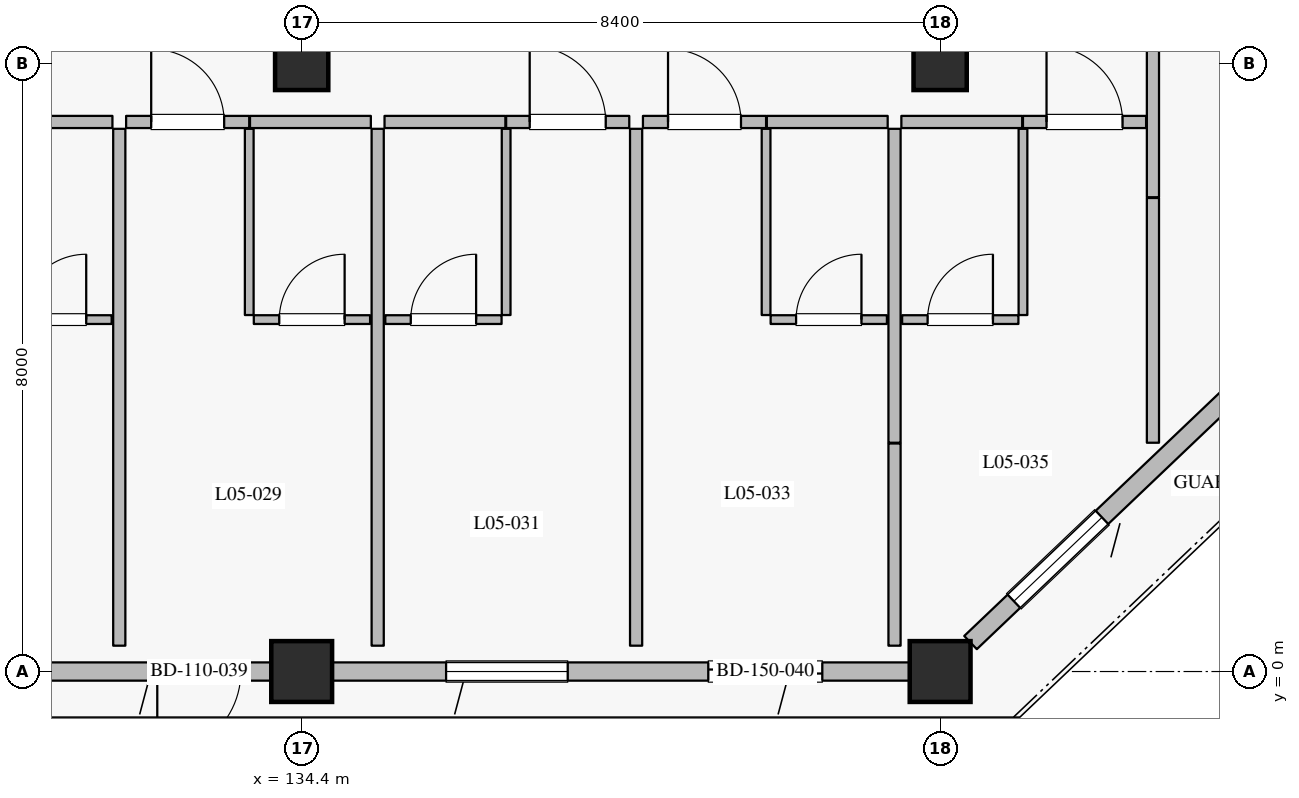
"""IFC4 building model, lengths in metres.
Left out: names, types, materials, properties, quantities, classifications, styles, units other than length and angle.
Written with IfcOpenShell. Run it as: python <this file> out.ifc"""

import sys

from ifc_helpers import new_model, si_unit, direction, frame, frame_2d, origin, origin_2d, place, context, subcontext, project, spatial, rectangle, extrude, element, fill, save


model = new_model("IFC4")
c1 = context("Model", 3, precision=1e-05, world=origin(), true_north=direction((0.0, 1.0)))
c2 = subcontext(c1, "Body", "Model", "MODEL_VIEW")
j1 = project(units=[si_unit("LENGTHUNIT", "METRE"), si_unit("PLANEANGLEUNIT", "RADIAN")], contexts=[c1])
p1 = place(None, origin())
s1 = spatial("IfcSite", under=j1, at=p1, CompositionType="ELEMENT")
p2 = place(p1, origin())
s2 = spatial("IfcBuilding", under=s1, at=p2, CompositionType="ELEMENT")
p3 = place(p2, frame((0.0, 0.0, 25.2)))
s3 = spatial("IfcBuildingStorey", under=s2, at=p3, CompositionType="ELEMENT", Elevation=25.2)
for number, where, z_axis, x_axis in (
    (1, (134.4, 0.0, 0.0), (0.0, 0.0, 1.0), (1.0, 0.0, 0.0)),
    (2, (142.8, 0.0, 0.0), (0.0, 0.0, 1.0), (1.0, 0.0, 0.0)),
):
    element("IfcColumn", number, at=place(p3, frame(where, z_axis=z_axis, x_axis=x_axis)), inside=s3, PredefinedType="COLUMN", context=c2, shape_type="SweptSolid", body=[
        extrude(rectangle(XDim=0.8, YDim=0.8, at=origin_2d()), origin(), (0.0, 0.0, 1.0), 3.6),
    ])
for number, where, z_axis, x_axis in (
    (3, (134.4, 8.0, 0.0), (0.0, 0.0, 1.0), (1.0, 0.0, 0.0)),
    (4, (142.8, 8.0, 0.0), (0.0, 0.0, 1.0), (1.0, 0.0, 0.0)),
):
    element("IfcColumn", number, at=place(p3, frame(where, z_axis=z_axis, x_axis=x_axis)), inside=s3, PredefinedType="COLUMN", context=c2, shape_type="SweptSolid", body=[
        extrude(rectangle(XDim=0.7, YDim=0.7, at=origin_2d()), origin(), (0.0, 0.0, 1.0), 3.6),
    ])
p4 = place(p3, frame((134.0, 0.0, 0.0), z_axis=(0.0, 0.0, 1.0), x_axis=(-1.0, 0.0, 0.0)))
e5 = element("IfcWall", 5, at=p4, inside=s3, PredefinedType="SOLIDWALL", context=c2, shape_type="SweptSolid", body=[
    extrude(rectangle(XDim=7.6, YDim=0.24, at=frame_2d((3.8, 0.0))), origin(), (0.0, 0.0, 1.0), 2.93),
])
p5 = place(p4, frame((0.4, 0.0, 0.0)))
e6 = element("IfcOpeningElement", 6, at=p5, cuts=e5, PredefinedType="OPENING", context=c2, shape_type="SweptSolid", body=[
    extrude(rectangle(XDim=1.1, YDim=2.2, at=frame_2d((0.55, 1.1))), frame((0.0, 0.13, 0.0), z_axis=(0.0, -1.0, 0.0), x_axis=(1.0, 0.0, 0.0)), (0.0, 0.0, 1.0), 0.26),
])
p6 = place(p4, frame((2.9, 0.0, 0.8)))
e7 = element("IfcOpeningElement", 7, at=p6, cuts=e5, PredefinedType="OPENING", context=c2, shape_type="SweptSolid", body=[
    extrude(rectangle(XDim=1.6, YDim=1.6, at=frame_2d((0.8, 0.8))), frame((0.0, 0.13, 0.0), z_axis=(0.0, -1.0, 0.0), x_axis=(1.0, 0.0, 0.0)), (0.0, 0.0, 1.0), 0.26),
])
p7 = place(p4, frame((5.75, 0.0, 0.8)))
e8 = element("IfcOpeningElement", 8, at=p7, cuts=e5, PredefinedType="OPENING", context=c2, shape_type="SweptSolid", body=[
    extrude(rectangle(XDim=1.6, YDim=1.6, at=frame_2d((0.8, 0.8))), frame((0.0, 0.13, 0.0), z_axis=(0.0, -1.0, 0.0), x_axis=(1.0, 0.0, 0.0)), (0.0, 0.0, 1.0), 0.26),
])
p8 = place(p3, frame((142.4, 0.0, 0.0), z_axis=(0.0, 0.0, 1.0), x_axis=(-1.0, 0.0, 0.0)))
e9 = element("IfcWall", 9, at=p8, inside=s3, PredefinedType="SOLIDWALL", context=c2, shape_type="SweptSolid", body=[
    extrude(rectangle(XDim=7.6, YDim=0.24, at=frame_2d((3.8, 0.0))), origin(), (0.0, 0.0, 1.0), 2.93),
])
p9 = place(p8, frame((1.15, 0.0, 0.0)))
e10 = element("IfcOpeningElement", 10, at=p9, cuts=e9, PredefinedType="OPENING", context=c2, shape_type="SweptSolid", body=[
    extrude(rectangle(XDim=1.5, YDim=2.25, at=frame_2d((0.75, 1.125))), frame((0.0, 0.13, 0.0), z_axis=(0.0, -1.0, 0.0), x_axis=(1.0, 0.0, 0.0)), (0.0, 0.0, 1.0), 0.26),
])
p10 = place(p8, frame((4.5, 0.0, 0.8)))
e11 = element("IfcOpeningElement", 11, at=p10, cuts=e9, PredefinedType="OPENING", context=c2, shape_type="SweptSolid", body=[
    extrude(rectangle(XDim=1.6, YDim=1.6, at=frame_2d((0.8, 0.8))), frame((0.0, 0.13, 0.0), z_axis=(0.0, -1.0, 0.0), x_axis=(1.0, 0.0, 0.0)), (0.0, 0.0, 1.0), 0.26),
])
p11 = place(p3, frame((150.8, 7.619, 0.0), z_axis=(0.0, 0.0, 1.0), x_axis=(-0.724156739794, -0.689635422677, 0.0)))
e12 = element("IfcWall", 12, at=p11, inside=s3, PredefinedType="SOLIDWALL", context=c2, shape_type="SweptSolid", body=[
    extrude(rectangle(XDim=10.495, YDim=0.24, at=frame_2d((5.248, 0.0))), origin(), (0.0, 0.0, 1.0), 2.93),
])
p12 = place(p11, frame((0.424, 0.0, 0.0)))
e13 = element("IfcOpeningElement", 13, at=p12, cuts=e12, PredefinedType="OPENING", context=c2, shape_type="SweptSolid", body=[
    extrude(rectangle(XDim=1.5, YDim=2.25, at=frame_2d((0.75, 1.125))), frame((0.0, 0.13, 0.0), z_axis=(0.0, -1.0, 0.0), x_axis=(1.0, 0.0, 0.0)), (0.0, 0.0, 1.0), 0.26),
])
p13 = place(p11, frame((4.033, 0.0, 0.8)))
e14 = element("IfcOpeningElement", 14, at=p13, cuts=e12, PredefinedType="OPENING", context=c2, shape_type="SweptSolid", body=[
    extrude(rectangle(XDim=1.6, YDim=1.6, at=frame_2d((0.8, 0.8))), frame((0.0, 0.13, 0.0), z_axis=(0.0, -1.0, 0.0), x_axis=(1.0, 0.0, 0.0)), (0.0, 0.0, 1.0), 0.26),
])
p14 = place(p11, frame((8.107, 0.0, 0.8)))
e15 = element("IfcOpeningElement", 15, at=p14, cuts=e12, PredefinedType="OPENING", context=c2, shape_type="SweptSolid", body=[
    extrude(rectangle(XDim=1.6, YDim=1.6, at=frame_2d((0.8, 0.8))), frame((0.0, 0.13, 0.0), z_axis=(0.0, -1.0, 0.0), x_axis=(1.0, 0.0, 0.0)), (0.0, 0.0, 1.0), 0.26),
])
p15 = place(p3, frame((130.32, 7.23, 0.0), z_axis=(0.0, 0.0, 1.0), x_axis=(1.0, 0.0, 0.0)))
e16 = element("IfcWall", 16, at=p15, inside=s3, PredefinedType="PARTITIONING", context=c2, shape_type="SweptSolid", body=[
    extrude(rectangle(XDim=1.59, YDim=0.16, at=frame_2d((0.795, 0.0))), origin(), (0.0, 0.0, 1.0), 3.335),
])
p16 = place(p3, frame((130.37, 4.63, 0.0), z_axis=(0.0, 0.0, 1.0), x_axis=(1.0, 0.0, 0.0)))
e17 = element("IfcWall", 17, at=p16, inside=s3, PredefinedType="PARTITIONING", context=c2, shape_type="SweptSolid", body=[
    extrude(rectangle(XDim=1.53, YDim=0.115, at=frame_2d((0.765, 0.0))), origin(), (0.0, 0.0, 1.0), 3.335),
])
p17 = place(p16, frame((0.335, 0.0, 0.0)))
e18 = element("IfcOpeningElement", 18, at=p17, cuts=e17, PredefinedType="OPENING", context=c2, shape_type="SweptSolid", body=[
    extrude(rectangle(XDim=0.86, YDim=2.12, at=frame_2d((0.43, 1.06))), frame((0.0, 0.067, 0.0), z_axis=(0.0, -1.0, 0.0), x_axis=(1.0, 0.0, 0.0)), (0.0, 0.0, 1.0), 0.135),
])
p18 = place(p3, frame((132.09, 7.23, 0.0), z_axis=(0.0, 0.0, 1.0), x_axis=(1.0, 0.0, 0.0)))
e19 = element("IfcWall", 19, at=p18, inside=s3, PredefinedType="PARTITIONING", context=c2, shape_type="SweptSolid", body=[
    extrude(rectangle(XDim=1.62, YDim=0.16, at=frame_2d((0.81, 0.0))), origin(), (0.0, 0.0, 1.0), 3.335),
])
p19 = place(p18, frame((0.33, 0.0, 0.0)))
e20 = element("IfcOpeningElement", 20, at=p19, cuts=e19, PredefinedType="OPENING", context=c2, shape_type="SweptSolid", body=[
    extrude(rectangle(XDim=0.96, YDim=2.2, at=frame_2d((0.48, 1.1))), frame((0.0, 0.09, 0.0), z_axis=(0.0, -1.0, 0.0), x_axis=(1.0, 0.0, 0.0)), (0.0, 0.0, 1.0), 0.18),
])
p20 = place(p3, frame((133.72, 7.23, 0.0), z_axis=(0.0, 0.0, 1.0), x_axis=(1.0, 0.0, 0.0)))
e21 = element("IfcWall", 21, at=p20, inside=s3, PredefinedType="PARTITIONING", context=c2, shape_type="SweptSolid", body=[
    extrude(rectangle(XDim=1.59, YDim=0.16, at=frame_2d((0.795, 0.0))), origin(), (0.0, 0.0, 1.0), 3.335),
])
p21 = place(p3, frame((133.71, 4.69, 0.0), z_axis=(0.0, 0.0, 1.0), x_axis=(0.0, 1.0, 0.0)))
e22 = element("IfcWall", 22, at=p21, inside=s3, PredefinedType="PARTITIONING", context=c2, shape_type="SweptSolid", body=[
    extrude(rectangle(XDim=2.45, YDim=0.115, at=frame_2d((1.225, 0.0))), origin(), (0.0, 0.0, 1.0), 3.335),
])
p22 = place(p3, frame((133.77, 4.63, 0.0), z_axis=(0.0, 0.0, 1.0), x_axis=(1.0, 0.0, 0.0)))
e23 = element("IfcWall", 23, at=p22, inside=s3, PredefinedType="PARTITIONING", context=c2, shape_type="SweptSolid", body=[
    extrude(rectangle(XDim=1.53, YDim=0.115, at=frame_2d((0.765, 0.0))), origin(), (0.0, 0.0, 1.0), 3.335),
])
p23 = place(p22, frame((0.335, 0.0, 0.0)))
e24 = element("IfcOpeningElement", 24, at=p23, cuts=e23, PredefinedType="OPENING", context=c2, shape_type="SweptSolid", body=[
    extrude(rectangle(XDim=0.86, YDim=2.12, at=frame_2d((0.43, 1.06))), frame((0.0, 0.067, 0.0), z_axis=(0.0, -1.0, 0.0), x_axis=(1.0, 0.0, 0.0)), (0.0, 0.0, 1.0), 0.135),
])
p24 = place(p3, frame((132.0, 0.34, 0.0), z_axis=(0.0, 0.0, 1.0), x_axis=(0.0, 1.0, 0.0)))
e25 = element("IfcWall", 25, at=p24, inside=s3, PredefinedType="PARTITIONING", context=c2, shape_type="SweptSolid", body=[
    extrude(rectangle(XDim=6.8, YDim=0.16, at=frame_2d((3.4, 0.0))), origin(), (0.0, 0.0, 1.0), 3.335),
])
p25 = place(p3, frame((135.49, 7.23, 0.0), z_axis=(0.0, 0.0, 1.0), x_axis=(1.0, 0.0, 0.0)))
e26 = element("IfcWall", 26, at=p25, inside=s3, PredefinedType="PARTITIONING", context=c2, shape_type="SweptSolid", body=[
    extrude(rectangle(XDim=1.59, YDim=0.16, at=frame_2d((0.795, 0.0))), origin(), (0.0, 0.0, 1.0), 3.335),
])
p26 = place(p3, frame((137.09, 7.23, 0.0), z_axis=(0.0, 0.0, 1.0), x_axis=(1.0, 0.0, 0.0)))
e27 = element("IfcWall", 27, at=p26, inside=s3, PredefinedType="PARTITIONING", context=c2, shape_type="SweptSolid", body=[
    extrude(rectangle(XDim=1.62, YDim=0.16, at=frame_2d((0.81, 0.0))), origin(), (0.0, 0.0, 1.0), 3.335),
])
p27 = place(p26, frame((0.31, 0.0, 0.0)))
e28 = element("IfcOpeningElement", 28, at=p27, cuts=e27, PredefinedType="OPENING", context=c2, shape_type="SweptSolid", body=[
    extrude(rectangle(XDim=1.0, YDim=2.25, at=frame_2d((0.5, 1.125))), frame((0.0, 0.09, 0.0), z_axis=(0.0, -1.0, 0.0), x_axis=(1.0, 0.0, 0.0)), (0.0, 0.0, 1.0), 0.18),
])
p28 = place(p3, frame((137.09, 4.69, 0.0), z_axis=(0.0, 0.0, 1.0), x_axis=(0.0, 1.0, 0.0)))
e29 = element("IfcWall", 29, at=p28, inside=s3, PredefinedType="PARTITIONING", context=c2, shape_type="SweptSolid", body=[
    extrude(rectangle(XDim=2.45, YDim=0.115, at=frame_2d((1.225, 0.0))), origin(), (0.0, 0.0, 1.0), 3.335),
])
p29 = place(p3, frame((135.5, 4.63, 0.0), z_axis=(0.0, 0.0, 1.0), x_axis=(1.0, 0.0, 0.0)))
e30 = element("IfcWall", 30, at=p29, inside=s3, PredefinedType="PARTITIONING", context=c2, shape_type="SweptSolid", body=[
    extrude(rectangle(XDim=1.53, YDim=0.115, at=frame_2d((0.765, 0.0))), origin(), (0.0, 0.0, 1.0), 3.335),
])
p30 = place(p29, frame((0.335, 0.0, 0.0)))
e31 = element("IfcOpeningElement", 31, at=p30, cuts=e30, PredefinedType="OPENING", context=c2, shape_type="SweptSolid", body=[
    extrude(rectangle(XDim=0.86, YDim=2.12, at=frame_2d((0.43, 1.06))), frame((0.0, 0.067, 0.0), z_axis=(0.0, -1.0, 0.0), x_axis=(1.0, 0.0, 0.0)), (0.0, 0.0, 1.0), 0.135),
])
p31 = place(p3, frame((135.4, 0.34, 0.0), z_axis=(0.0, 0.0, 1.0), x_axis=(0.0, 1.0, 0.0)))
e32 = element("IfcWall", 32, at=p31, inside=s3, PredefinedType="PARTITIONING", context=c2, shape_type="SweptSolid", body=[
    extrude(rectangle(XDim=6.8, YDim=0.16, at=frame_2d((3.4, 0.0))), origin(), (0.0, 0.0, 1.0), 3.335),
])
p32 = place(p3, frame((138.89, 7.23, 0.0), z_axis=(0.0, 0.0, 1.0), x_axis=(1.0, 0.0, 0.0)))
e33 = element("IfcWall", 33, at=p32, inside=s3, PredefinedType="PARTITIONING", context=c2, shape_type="SweptSolid", body=[
    extrude(rectangle(XDim=1.62, YDim=0.16, at=frame_2d((0.81, 0.0))), origin(), (0.0, 0.0, 1.0), 3.335),
])
p33 = place(p32, frame((0.33, 0.0, 0.0)))
e34 = element("IfcOpeningElement", 34, at=p33, cuts=e33, PredefinedType="OPENING", context=c2, shape_type="SweptSolid", body=[
    extrude(rectangle(XDim=0.96, YDim=2.2, at=frame_2d((0.48, 1.1))), frame((0.0, 0.09, 0.0), z_axis=(0.0, -1.0, 0.0), x_axis=(1.0, 0.0, 0.0)), (0.0, 0.0, 1.0), 0.18),
])
p34 = place(p3, frame((140.52, 7.23, 0.0), z_axis=(0.0, 0.0, 1.0), x_axis=(1.0, 0.0, 0.0)))
e35 = element("IfcWall", 35, at=p34, inside=s3, PredefinedType="PARTITIONING", context=c2, shape_type="SweptSolid", body=[
    extrude(rectangle(XDim=1.59, YDim=0.16, at=frame_2d((0.795, 0.0))), origin(), (0.0, 0.0, 1.0), 3.335),
])
p35 = place(p3, frame((140.51, 4.69, 0.0), z_axis=(0.0, 0.0, 1.0), x_axis=(0.0, 1.0, 0.0)))
e36 = element("IfcWall", 36, at=p35, inside=s3, PredefinedType="PARTITIONING", context=c2, shape_type="SweptSolid", body=[
    extrude(rectangle(XDim=2.45, YDim=0.115, at=frame_2d((1.225, 0.0))), origin(), (0.0, 0.0, 1.0), 3.335),
])
p36 = place(p3, frame((140.57, 4.63, 0.0), z_axis=(0.0, 0.0, 1.0), x_axis=(1.0, 0.0, 0.0)))
e37 = element("IfcWall", 37, at=p36, inside=s3, PredefinedType="PARTITIONING", context=c2, shape_type="SweptSolid", body=[
    extrude(rectangle(XDim=1.53, YDim=0.115, at=frame_2d((0.765, 0.0))), origin(), (0.0, 0.0, 1.0), 3.335),
])
p37 = place(p36, frame((0.335, 0.0, 0.0)))
e38 = element("IfcOpeningElement", 38, at=p37, cuts=e37, PredefinedType="OPENING", context=c2, shape_type="SweptSolid", body=[
    extrude(rectangle(XDim=0.86, YDim=2.12, at=frame_2d((0.43, 1.06))), frame((0.0, 0.067, 0.0), z_axis=(0.0, -1.0, 0.0), x_axis=(1.0, 0.0, 0.0)), (0.0, 0.0, 1.0), 0.135),
])
p38 = place(p3, frame((138.8, 0.34, 0.0), z_axis=(0.0, 0.0, 1.0), x_axis=(0.0, 1.0, 0.0)))
e39 = element("IfcWall", 39, at=p38, inside=s3, PredefinedType="PARTITIONING", context=c2, shape_type="SweptSolid", body=[
    extrude(rectangle(XDim=6.8, YDim=0.16, at=frame_2d((3.4, 0.0))), origin(), (0.0, 0.0, 1.0), 3.335),
])
p39 = place(p3, frame((142.2, 0.34, 0.0), z_axis=(0.0, 0.0, 1.0), x_axis=(0.0, 1.0, 0.0)))
e40 = element("IfcWall", 40, at=p39, inside=s3, PredefinedType="PARTITIONING", context=c2, shape_type="SweptSolid", body=[
    extrude(rectangle(XDim=2.66, YDim=0.16, at=frame_2d((1.33, 0.0))), origin(), (0.0, 0.0, 1.0), 3.335),
])
p40 = place(p3, frame((142.29, 7.23, 0.0), z_axis=(0.0, 0.0, 1.0), x_axis=(1.0, 0.0, 0.0)))
e41 = element("IfcWall", 41, at=p40, inside=s3, PredefinedType="PARTITIONING", context=c2, shape_type="SweptSolid", body=[
    extrude(rectangle(XDim=1.59, YDim=0.16, at=frame_2d((0.795, 0.0))), origin(), (0.0, 0.0, 1.0), 3.335),
])
p41 = place(p3, frame((143.89, 7.23, 0.0), z_axis=(0.0, 0.0, 1.0), x_axis=(1.0, 0.0, 0.0)))
e42 = element("IfcWall", 42, at=p41, inside=s3, PredefinedType="PARTITIONING", context=c2, shape_type="SweptSolid", body=[
    extrude(rectangle(XDim=1.62, YDim=0.16, at=frame_2d((0.81, 0.0))), origin(), (0.0, 0.0, 1.0), 3.335),
])
p42 = place(p41, frame((0.31, 0.0, 0.0)))
e43 = element("IfcOpeningElement", 43, at=p42, cuts=e42, PredefinedType="OPENING", context=c2, shape_type="SweptSolid", body=[
    extrude(rectangle(XDim=1.0, YDim=2.25, at=frame_2d((0.5, 1.125))), frame((0.0, 0.09, 0.0), z_axis=(0.0, -1.0, 0.0), x_axis=(1.0, 0.0, 0.0)), (0.0, 0.0, 1.0), 0.18),
])
p43 = place(p3, frame((143.89, 4.69, 0.0), z_axis=(0.0, 0.0, 1.0), x_axis=(0.0, 1.0, 0.0)))
e44 = element("IfcWall", 44, at=p43, inside=s3, PredefinedType="PARTITIONING", context=c2, shape_type="SweptSolid", body=[
    extrude(rectangle(XDim=2.45, YDim=0.115, at=frame_2d((1.225, 0.0))), origin(), (0.0, 0.0, 1.0), 3.335),
])
p44 = place(p3, frame((142.3, 4.63, 0.0), z_axis=(0.0, 0.0, 1.0), x_axis=(1.0, 0.0, 0.0)))
e45 = element("IfcWall", 45, at=p44, inside=s3, PredefinedType="PARTITIONING", context=c2, shape_type="SweptSolid", body=[
    extrude(rectangle(XDim=1.53, YDim=0.115, at=frame_2d((0.765, 0.0))), origin(), (0.0, 0.0, 1.0), 3.335),
])
p45 = place(p44, frame((0.335, 0.0, 0.0)))
e46 = element("IfcOpeningElement", 46, at=p45, cuts=e45, PredefinedType="OPENING", context=c2, shape_type="SweptSolid", body=[
    extrude(rectangle(XDim=0.86, YDim=2.12, at=frame_2d((0.43, 1.06))), frame((0.0, 0.067, 0.0), z_axis=(0.0, -1.0, 0.0), x_axis=(1.0, 0.0, 0.0)), (0.0, 0.0, 1.0), 0.135),
])
p46 = place(p3, frame((142.2, 3.01, 0.0), z_axis=(0.0, 0.0, 1.0), x_axis=(0.0, 1.0, 0.0)))
e47 = element("IfcWall", 47, at=p46, inside=s3, PredefinedType="PARTITIONING", context=c2, shape_type="SweptSolid", body=[
    extrude(rectangle(XDim=4.13, YDim=0.16, at=frame_2d((2.065, 0.0))), origin(), (0.0, 0.0, 1.0), 3.335),
])
p47 = place(p3, frame((145.6, 3.01, 0.0), z_axis=(0.0, 0.0, 1.0), x_axis=(0.0, 1.0, 0.0)))
e48 = element("IfcWall", 48, at=p47, inside=s3, PredefinedType="PARTITIONING", context=c2, shape_type="SweptSolid", body=[
    extrude(rectangle(XDim=3.22, YDim=0.16, at=frame_2d((1.61, 0.0))), origin(), (0.0, 0.0, 1.0), 3.335),
])
p48 = place(p3, frame((145.6, 6.24, 0.0), z_axis=(0.0, 0.0, 1.0), x_axis=(0.0, 1.0, 0.0)))
e49 = element("IfcWall", 49, at=p48, inside=s3, PredefinedType="PARTITIONING", context=c2, shape_type="SweptSolid", body=[
    extrude(rectangle(XDim=8.3, YDim=0.16, at=frame_2d((4.15, 0.0))), origin(), (0.0, 0.0, 1.0), 3.335),
])
p49 = place(p5, origin())
e50 = element("IfcDoor", 50, at=p49, inside=s3, OperationType="SINGLE_SWING_RIGHT", PredefinedType="DOOR", context=c2, shape_type="SweptSolid", body=[
    extrude(rectangle(XDim=1.1, YDim=2.2, at=frame_2d((0.55, 1.1))), frame((0.0, 0.025, 0.0), z_axis=(0.0, -1.0, 0.0), x_axis=(1.0, 0.0, 0.0)), (0.0, 0.0, 1.0), 0.05),
])
fill(e6, e50)
p50 = place(p9, origin())
e51 = element("IfcDoor", 51, at=p50, inside=s3, OperationType="SLIDING_TO_LEFT", PredefinedType="DOOR", context=c2, shape_type="SweptSolid", body=[
    extrude(rectangle(XDim=1.5, YDim=2.25, at=frame_2d((0.75, 1.125))), frame((0.0, 0.025, 0.0), z_axis=(0.0, -1.0, 0.0), x_axis=(1.0, 0.0, 0.0)), (0.0, 0.0, 1.0), 0.05),
])
fill(e10, e51)
p51 = place(p10, origin())
e52 = element("IfcWindow", 52, at=p51, inside=s3, PartitioningType="SINGLE_PANEL", PredefinedType="WINDOW", context=c2, shape_type="SweptSolid", body=[
    extrude(rectangle(XDim=1.6, YDim=1.6, at=frame_2d((0.8, 0.8))), frame((0.0, 0.03, 0.0), z_axis=(0.0, -1.0, 0.0), x_axis=(1.0, 0.0, 0.0)), (0.0, 0.0, 1.0), 0.06),
])
fill(e11, e52)
p52 = place(p14, origin())
e53 = element("IfcWindow", 53, at=p52, inside=s3, PartitioningType="SINGLE_PANEL", PredefinedType="WINDOW", context=c2, shape_type="SweptSolid", body=[
    extrude(rectangle(XDim=1.6, YDim=1.6, at=frame_2d((0.8, 0.8))), frame((0.0, 0.03, 0.0), z_axis=(0.0, -1.0, 0.0), x_axis=(1.0, 0.0, 0.0)), (0.0, 0.0, 1.0), 0.06),
])
fill(e15, e53)
p53 = place(p17, origin())
e54 = element("IfcDoor", 54, at=p53, inside=s3, OperationType="SINGLE_SWING_RIGHT", PredefinedType="DOOR", context=c2, shape_type="SweptSolid", body=[
    extrude(rectangle(XDim=0.86, YDim=2.12, at=frame_2d((0.43, 1.06))), frame((0.0, 0.025, 0.0), z_axis=(0.0, -1.0, 0.0), x_axis=(1.0, 0.0, 0.0)), (0.0, 0.0, 1.0), 0.05),
])
fill(e18, e54)
p54 = place(p19, origin())
e55 = element("IfcDoor", 55, at=p54, inside=s3, OperationType="SINGLE_SWING_LEFT", PredefinedType="DOOR", context=c2, shape_type="SweptSolid", body=[
    extrude(rectangle(XDim=0.96, YDim=2.2, at=frame_2d((0.48, 1.1))), frame((0.0, 0.025, 0.0), z_axis=(0.0, -1.0, 0.0), x_axis=(1.0, 0.0, 0.0)), (0.0, 0.0, 1.0), 0.05),
])
fill(e20, e55)
p55 = place(p23, origin())
e56 = element("IfcDoor", 56, at=p55, inside=s3, OperationType="SINGLE_SWING_RIGHT", PredefinedType="DOOR", context=c2, shape_type="SweptSolid", body=[
    extrude(rectangle(XDim=0.86, YDim=2.12, at=frame_2d((0.43, 1.06))), frame((0.0, 0.025, 0.0), z_axis=(0.0, -1.0, 0.0), x_axis=(1.0, 0.0, 0.0)), (0.0, 0.0, 1.0), 0.05),
])
fill(e24, e56)
p56 = place(p27, origin())
e57 = element("IfcDoor", 57, at=p56, inside=s3, OperationType="SINGLE_SWING_LEFT", PredefinedType="DOOR", context=c2, shape_type="SweptSolid", body=[
    extrude(rectangle(XDim=1.0, YDim=2.25, at=frame_2d((0.5, 1.125))), frame((0.0, 0.025, 0.0), z_axis=(0.0, -1.0, 0.0), x_axis=(1.0, 0.0, 0.0)), (0.0, 0.0, 1.0), 0.05),
])
fill(e28, e57)
p57 = place(p30, origin())
e58 = element("IfcDoor", 58, at=p57, inside=s3, OperationType="SINGLE_SWING_RIGHT", PredefinedType="DOOR", context=c2, shape_type="SweptSolid", body=[
    extrude(rectangle(XDim=0.86, YDim=2.12, at=frame_2d((0.43, 1.06))), frame((0.0, 0.025, 0.0), z_axis=(0.0, -1.0, 0.0), x_axis=(1.0, 0.0, 0.0)), (0.0, 0.0, 1.0), 0.05),
])
fill(e31, e58)
p58 = place(p33, origin())
e59 = element("IfcDoor", 59, at=p58, inside=s3, OperationType="SINGLE_SWING_LEFT", PredefinedType="DOOR", context=c2, shape_type="SweptSolid", body=[
    extrude(rectangle(XDim=0.96, YDim=2.2, at=frame_2d((0.48, 1.1))), frame((0.0, 0.025, 0.0), z_axis=(0.0, -1.0, 0.0), x_axis=(1.0, 0.0, 0.0)), (0.0, 0.0, 1.0), 0.05),
])
fill(e34, e59)
p59 = place(p37, origin())
e60 = element("IfcDoor", 60, at=p59, inside=s3, OperationType="SINGLE_SWING_RIGHT", PredefinedType="DOOR", context=c2, shape_type="SweptSolid", body=[
    extrude(rectangle(XDim=0.86, YDim=2.12, at=frame_2d((0.43, 1.06))), frame((0.0, 0.025, 0.0), z_axis=(0.0, -1.0, 0.0), x_axis=(1.0, 0.0, 0.0)), (0.0, 0.0, 1.0), 0.05),
])
fill(e38, e60)
p60 = place(p42, origin())
e61 = element("IfcDoor", 61, at=p60, inside=s3, OperationType="SINGLE_SWING_LEFT", PredefinedType="DOOR", context=c2, shape_type="SweptSolid", body=[
    extrude(rectangle(XDim=1.0, YDim=2.25, at=frame_2d((0.5, 1.125))), frame((0.0, 0.025, 0.0), z_axis=(0.0, -1.0, 0.0), x_axis=(1.0, 0.0, 0.0)), (0.0, 0.0, 1.0), 0.05),
])
fill(e43, e61)
p61 = place(p45, origin())
e62 = element("IfcDoor", 62, at=p61, inside=s3, OperationType="SINGLE_SWING_RIGHT", PredefinedType="DOOR", context=c2, shape_type="SweptSolid", body=[
    extrude(rectangle(XDim=0.86, YDim=2.12, at=frame_2d((0.43, 1.06))), frame((0.0, 0.025, 0.0), z_axis=(0.0, -1.0, 0.0), x_axis=(1.0, 0.0, 0.0)), (0.0, 0.0, 1.0), 0.05),
])
fill(e46, e62)
save(model, sys.argv[1])
